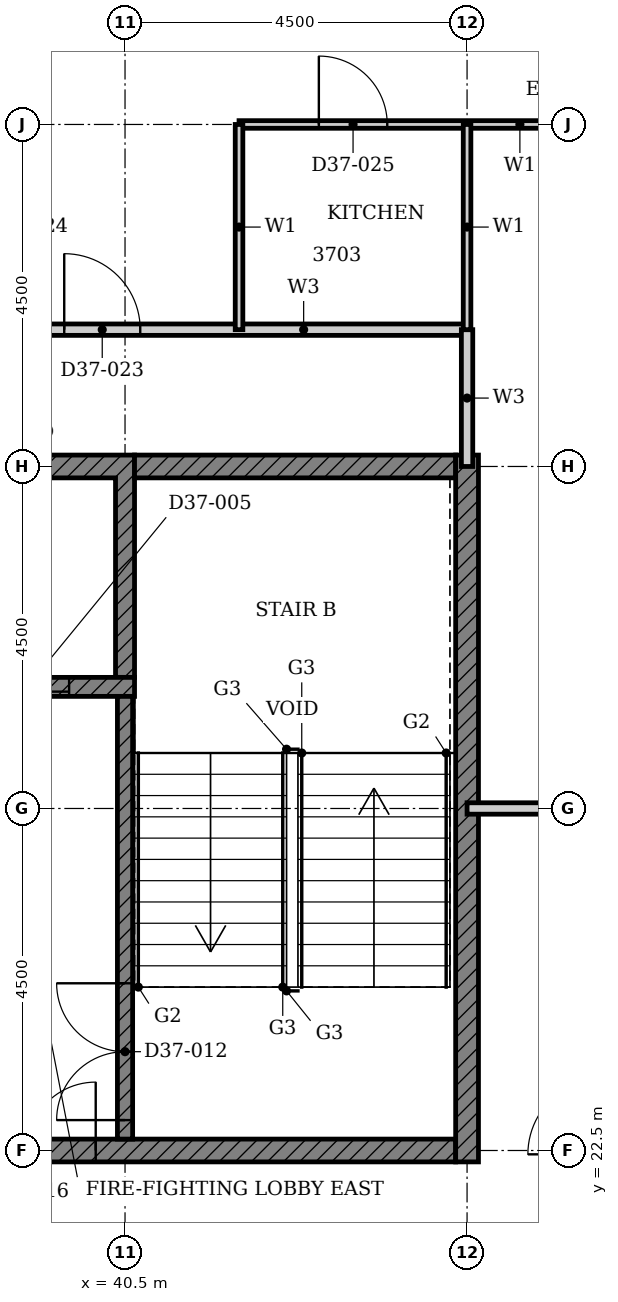
"""IFC4 building model, lengths in metres.
Left out: names, types, materials, properties, quantities, classifications, styles, units other than length and angle.
Written with IfcOpenShell. Run it as: python <this file> out.ifc"""

import sys

from ifc_helpers import new_model, si_unit, direction, frame, frame_2d, origin, place, context, subcontext, project, spatial, polyline, rectangle, outline, extrude, element, fill, save


model = new_model("IFC4")
c1 = context("Model", 3, precision=1e-05, world=origin(), true_north=direction((0.0, 1.0)))
c2 = subcontext(c1, "Body", "Model", "MODEL_VIEW")
j1 = project(units=[si_unit("LENGTHUNIT", "METRE"), si_unit("PLANEANGLEUNIT", "RADIAN")], contexts=[c1])
p1 = place(None, origin())
s1 = spatial("IfcSite", under=j1, at=p1, CompositionType="ELEMENT")
p2 = place(p1, origin())
s2 = spatial("IfcBuilding", under=s1, at=p2, CompositionType="ELEMENT")
p3 = place(p2, frame((0.0, 0.0, 150.6)))
s3 = spatial("IfcBuildingStorey", under=s2, at=p3, CompositionType="ELEMENT", Elevation=150.6)
p4 = place(p3, origin())
e1 = element("IfcWall", 1, at=p4, inside=s3, PredefinedType="SHEAR", context=c2, shape_type="SweptSolid", body=[
    extrude(outline(polyline([(35.232, 28.725), (35.482, 28.725), (35.482, 31.35), (37.803, 31.35), (37.803, 28.725), (38.053, 28.725), (38.053, 31.35), (40.375, 31.35), (40.375, 28.725), (40.625, 28.725), (40.625, 31.65), (35.232, 31.65), (35.232, 28.725)])), origin(), (0.0, 0.0, 1.0), 3.4),
])
p5 = place(p3, frame((32.911, 22.5, 0.0), z_axis=(0.0, 0.0, 1.0), x_axis=(1.0, 0.0, 0.0)))
e2 = element("IfcWall", 2, at=p5, inside=s3, PredefinedType="SHEAR", context=c2, shape_type="SweptSolid", body=[
    extrude(rectangle(XDim=11.939, YDim=0.3, at=frame_2d((5.97, 0.0))), origin(), (0.0, 0.0, 1.0), 3.4),
])
p6 = place(p5, frame((5.404, 0.0, 0.0)))
e3 = element("IfcOpeningElement", 3, at=p6, cuts=e2, PredefinedType="OPENING", context=c2, shape_type="SweptSolid", body=[
    extrude(rectangle(XDim=1.8, YDim=2.1, at=frame_2d((0.9, 1.05))), frame((0.0, 0.16, 0.0), z_axis=(0.0, -1.0, 0.0), x_axis=(1.0, 0.0, 0.0)), (0.0, 0.0, 1.0), 0.32),
])
p7 = place(p3, frame((40.625, 31.5, 0.0), z_axis=(0.0, 0.0, 1.0), x_axis=(1.0, 0.0, 0.0)))
e4 = element("IfcWall", 4, at=p7, inside=s3, PredefinedType="SHEAR", context=c2, shape_type="SweptSolid", body=[
    extrude(rectangle(XDim=4.225, YDim=0.3, at=frame_2d((2.113, 0.0))), origin(), (0.0, 0.0, 1.0), 3.4),
])
p8 = place(p3, frame((45.0, 22.35, 0.0), z_axis=(0.0, 0.0, 1.0), x_axis=(0.0, 1.0, 0.0)))
e5 = element("IfcWall", 5, at=p8, inside=s3, PredefinedType="SHEAR", context=c2, shape_type="SweptSolid", body=[
    extrude(rectangle(XDim=9.3, YDim=0.3, at=frame_2d((4.65, 0.0))), origin(), (0.0, 0.0, 1.0), 3.4),
])
p9 = place(p3, frame((24.947, 28.6, 0.0), z_axis=(0.0, 0.0, 1.0), x_axis=(1.0, 0.0, 0.0)))
e6 = element("IfcWall", 6, at=p9, inside=s3, PredefinedType="SHEAR", context=c2, shape_type="SweptSolid", body=[
    extrude(rectangle(XDim=15.678, YDim=0.25, at=frame_2d((7.839, 0.0))), origin(), (0.0, 0.0, 1.0), 3.4),
])
p10 = place(p9, frame((6.004, 0.0, 0.0)))
e7 = element("IfcOpeningElement", 7, at=p10, cuts=e6, PredefinedType="OPENING", context=c2, shape_type="SweptSolid", body=[
    extrude(rectangle(XDim=1.1, YDim=2.1, at=frame_2d((0.55, 1.05))), frame((0.0, 0.135, 0.0), z_axis=(0.0, -1.0, 0.0), x_axis=(1.0, 0.0, 0.0)), (0.0, 0.0, 1.0), 0.27),
])
p11 = place(p9, frame((11.146, 0.0, 0.0)))
e8 = element("IfcOpeningElement", 8, at=p11, cuts=e6, PredefinedType="OPENING", context=c2, shape_type="SweptSolid", body=[
    extrude(rectangle(XDim=1.1, YDim=2.1, at=frame_2d((0.55, 1.05))), frame((0.0, 0.135, 0.0), z_axis=(0.0, -1.0, 0.0), x_axis=(1.0, 0.0, 0.0)), (0.0, 0.0, 1.0), 0.27),
])
p12 = place(p9, frame((13.718, 0.0, 0.0)))
e9 = element("IfcOpeningElement", 9, at=p12, cuts=e6, PredefinedType="OPENING", context=c2, shape_type="SweptSolid", body=[
    extrude(rectangle(XDim=1.1, YDim=2.1, at=frame_2d((0.55, 1.05))), frame((0.0, 0.135, 0.0), z_axis=(0.0, -1.0, 0.0), x_axis=(1.0, 0.0, 0.0)), (0.0, 0.0, 1.0), 0.27),
])
p13 = place(p9, frame((0.961, 0.0, 0.0)))
e10 = element("IfcOpeningElement", 10, at=p13, cuts=e6, PredefinedType="OPENING", context=c2, shape_type="SweptSolid", body=[
    extrude(rectangle(XDim=0.9, YDim=2.1, at=frame_2d((0.45, 1.05))), frame((0.0, 0.135, 0.0), z_axis=(0.0, -1.0, 0.0), x_axis=(1.0, 0.0, 0.0)), (0.0, 0.0, 1.0), 0.27),
])
p14 = place(p9, frame((8.675, 0.0, 0.0)))
e11 = element("IfcOpeningElement", 11, at=p14, cuts=e6, PredefinedType="OPENING", context=c2, shape_type="SweptSolid", body=[
    extrude(rectangle(XDim=0.9, YDim=2.1, at=frame_2d((0.45, 1.05))), frame((0.0, 0.135, 0.0), z_axis=(0.0, -1.0, 0.0), x_axis=(1.0, 0.0, 0.0)), (0.0, 0.0, 1.0), 0.27),
])
p15 = place(p3, frame((40.5, 22.65, 0.0), z_axis=(0.0, 0.0, 1.0), x_axis=(0.0, 1.0, 0.0)))
e12 = element("IfcWall", 12, at=p15, inside=s3, PredefinedType="SHEAR", context=c2, shape_type="SweptSolid", body=[
    extrude(rectangle(XDim=5.825, YDim=0.2, at=frame_2d((2.913, 0.0))), origin(), (0.0, 0.0, 1.0), 3.4),
])
p16 = place(p15, frame((0.25, 0.0, 0.0)))
e13 = element("IfcOpeningElement", 13, at=p16, cuts=e12, PredefinedType="OPENING", context=c2, shape_type="SweptSolid", body=[
    extrude(rectangle(XDim=1.8, YDim=2.1, at=frame_2d((0.9, 1.05))), frame((0.0, 0.11, 0.0), z_axis=(0.0, -1.0, 0.0), x_axis=(1.0, 0.0, 0.0)), (0.0, 0.0, 1.0), 0.22),
])
p17 = place(p3, frame((45.0, 27.0, 0.0), z_axis=(0.0, 0.0, 1.0), x_axis=(1.0, 0.0, 0.0)))
e14 = element("IfcWall", 14, at=p17, inside=s3, PredefinedType="PARTITIONING", context=c2, shape_type="SweptSolid", body=[
    extrude(rectangle(XDim=13.5, YDim=0.15, at=frame_2d((6.75, 0.0))), origin(), (0.0, 0.0, 1.0), 2.68),
])
p18 = place(p17, frame((7.15, 0.0, 0.0)))
e15 = element("IfcOpeningElement", 15, at=p18, cuts=e14, PredefinedType="OPENING", context=c2, shape_type="SweptSolid", body=[
    extrude(rectangle(XDim=1.0, YDim=2.1, at=frame_2d((0.5, 1.05))), frame((0.0, 0.085, 0.0), z_axis=(0.0, -1.0, 0.0), x_axis=(1.0, 0.0, 0.0)), (0.0, 0.0, 1.0), 0.17),
])
p19 = place(p3, frame((38.4, 33.3, 0.0), z_axis=(0.0, 0.0, 1.0), x_axis=(1.0, 0.0, 0.0)))
e16 = element("IfcWall", 16, at=p19, inside=s3, PredefinedType="PARTITIONING", context=c2, shape_type="SweptSolid", body=[
    extrude(rectangle(XDim=6.6, YDim=0.15, at=frame_2d((3.3, 0.0))), origin(), (0.0, 0.0, 1.0), 3.4),
])
p20 = place(p19, frame((1.3, 0.0, 0.0)))
e17 = element("IfcOpeningElement", 17, at=p20, cuts=e16, PredefinedType="OPENING", context=c2, shape_type="SweptSolid", body=[
    extrude(rectangle(XDim=1.0, YDim=2.2, at=frame_2d((0.5, 1.1))), frame((0.0, 0.085, 0.0), z_axis=(0.0, -1.0, 0.0), x_axis=(1.0, 0.0, 0.0)), (0.0, 0.0, 1.0), 0.17),
])
p21 = place(p3, frame((45.0, 31.5, 0.0), z_axis=(0.0, 0.0, 1.0), x_axis=(0.0, 1.0, 0.0)))
e18 = element("IfcWall", 18, at=p21, inside=s3, PredefinedType="PARTITIONING", context=c2, shape_type="SweptSolid", body=[
    extrude(rectangle(XDim=1.8, YDim=0.15, at=frame_2d((0.9, 0.0))), origin(), (0.0, 0.0, 1.0), 3.4),
])
p22 = place(p3, frame((42.0, 36.0, 0.0), z_axis=(0.0, 0.0, 1.0), x_axis=(1.0, 0.0, 0.0)))
e19 = element("IfcWall", 19, at=p22, inside=s3, PredefinedType="PARTITIONING", context=c2, shape_type="SweptSolid", body=[
    extrude(rectangle(XDim=5.44, YDim=0.1, at=frame_2d((2.72, 0.0))), origin(), (0.0, 0.0, 1.0), 3.4),
])
p23 = place(p22, frame((1.05, 0.0, 0.0)))
e20 = element("IfcOpeningElement", 20, at=p23, cuts=e19, PredefinedType="OPENING", context=c2, shape_type="SweptSolid", body=[
    extrude(rectangle(XDim=0.9, YDim=2.1, at=frame_2d((0.45, 1.05))), frame((0.0, 0.06, 0.0), z_axis=(0.0, -1.0, 0.0), x_axis=(1.0, 0.0, 0.0)), (0.0, 0.0, 1.0), 0.12),
])
for number, where, z_axis, x_axis in (
    (21, (42.0, 33.3, 0.0), (0.0, 0.0, 1.0), (0.0, 1.0, 0.0)),
    (22, (45.0, 33.3, 0.0), (0.0, 0.0, 1.0), (0.0, 1.0, 0.0)),
):
    element("IfcWall", number, at=place(p3, frame(where, z_axis=z_axis, x_axis=x_axis)), inside=s3, PredefinedType="PARTITIONING", context=c2, shape_type="SweptSolid", body=[
        extrude(rectangle(XDim=2.7, YDim=0.1, at=frame_2d((1.35, 0.0))), origin(), (0.0, 0.0, 1.0), 3.4),
    ])
p24 = place(p12, origin())
e23 = element("IfcDoor", 23, at=p24, inside=s3, OperationType="DOUBLE_DOOR_SLIDING", PredefinedType="DOOR", context=c2, shape_type="SweptSolid", body=[
    extrude(rectangle(XDim=1.1, YDim=2.1, at=frame_2d((0.55, 1.05))), frame((0.0, 0.025, 0.0), z_axis=(0.0, -1.0, 0.0), x_axis=(1.0, 0.0, 0.0)), (0.0, 0.0, 1.0), 0.05),
])
fill(e9, e23)
p25 = place(p16, origin())
e24 = element("IfcDoor", 24, at=p25, inside=s3, OperationType="DOUBLE_DOOR_SINGLE_SWING", PredefinedType="DOOR", context=c2, shape_type="SweptSolid", body=[
    extrude(rectangle(XDim=1.8, YDim=2.1, at=frame_2d((0.9, 1.05))), frame((0.0, 0.025, 0.0), z_axis=(0.0, -1.0, 0.0), x_axis=(1.0, 0.0, 0.0)), (0.0, 0.0, 1.0), 0.05),
])
fill(e13, e24)
p26 = place(p6, origin())
e25 = element("IfcDoor", 25, at=p26, inside=s3, OperationType="DOUBLE_DOOR_SINGLE_SWING", PredefinedType="DOOR", context=c2, shape_type="SweptSolid", body=[
    extrude(rectangle(XDim=1.8, YDim=2.1, at=frame_2d((0.9, 1.05))), frame((0.0, 0.025, 0.0), z_axis=(0.0, -1.0, 0.0), x_axis=(1.0, 0.0, 0.0)), (0.0, 0.0, 1.0), 0.05),
])
fill(e3, e25)
p27 = place(p20, origin())
e26 = element("IfcDoor", 26, at=p27, inside=s3, OperationType="SINGLE_SWING_LEFT", PredefinedType="DOOR", context=c2, shape_type="SweptSolid", body=[
    extrude(rectangle(XDim=1.0, YDim=2.2, at=frame_2d((0.5, 1.1))), frame((0.0, 0.025, 0.0), z_axis=(0.0, -1.0, 0.0), x_axis=(1.0, 0.0, 0.0)), (0.0, 0.0, 1.0), 0.05),
])
fill(e17, e26)
p28 = place(p23, origin())
e27 = element("IfcDoor", 27, at=p28, inside=s3, OperationType="SINGLE_SWING_LEFT", PredefinedType="DOOR", context=c2, shape_type="SweptSolid", body=[
    extrude(rectangle(XDim=0.9, YDim=2.1, at=frame_2d((0.45, 1.05))), frame((0.0, 0.025, 0.0), z_axis=(0.0, -1.0, 0.0), x_axis=(1.0, 0.0, 0.0)), (0.0, 0.0, 1.0), 0.05),
])
fill(e20, e27)
save(model, sys.argv[1])
